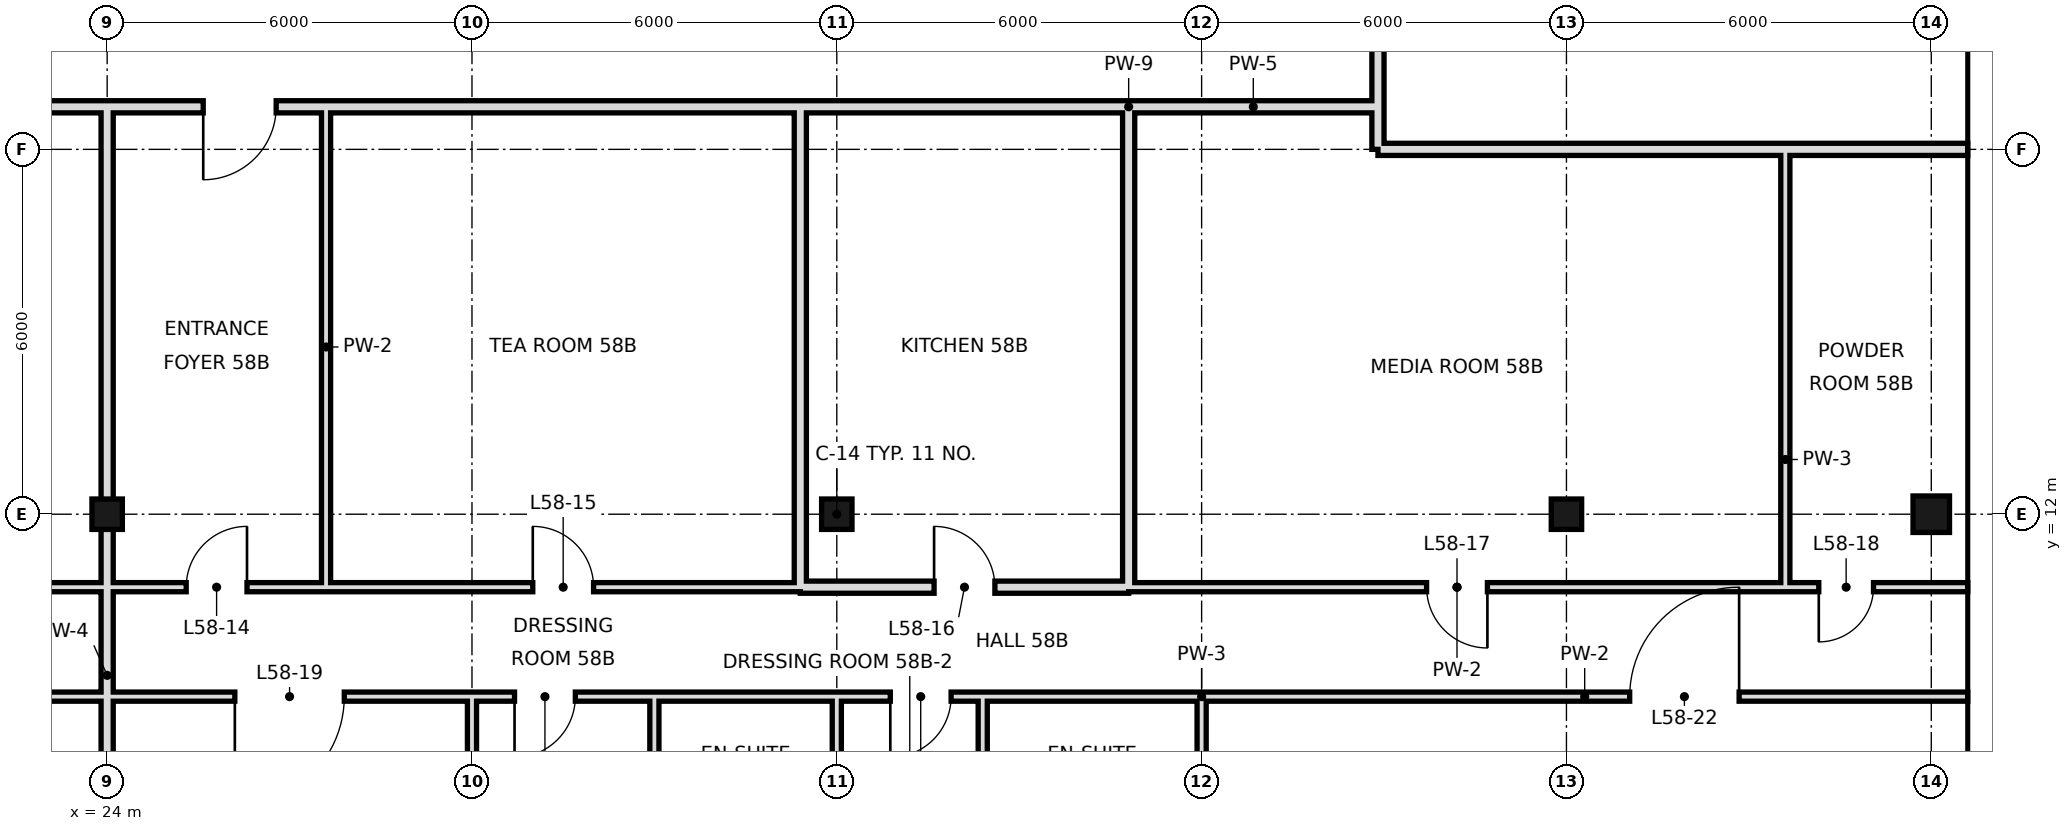
"""IFC4 building model, lengths in metres.
Left out: names, types, materials, properties, quantities, classifications, styles, units other than length and angle.
Written with IfcOpenShell. Run it as: python <this file> out.ifc"""

import sys

from ifc_helpers import new_model, si_unit, direction, frame, frame_2d, origin, origin_2d, place, context, subcontext, project, spatial, rectangle, hollow_rectangle, extrude, element, fill, save


model = new_model("IFC4")
c1 = context("Model", 3, precision=1e-05, world=origin(), true_north=direction((0.0, 1.0)))
c2 = subcontext(c1, "Body", "Model", "MODEL_VIEW")
j1 = project(units=[si_unit("LENGTHUNIT", "METRE"), si_unit("PLANEANGLEUNIT", "RADIAN")], contexts=[c1])
p1 = place(None, origin())
s1 = spatial("IfcSite", under=j1, at=p1, CompositionType="ELEMENT")
p2 = place(p1, origin())
s2 = spatial("IfcBuilding", under=s1, at=p2, CompositionType="ELEMENT")
p3 = place(p2, frame((0.0, 0.0, 246.8)))
s3 = spatial("IfcBuildingStorey", under=s2, at=p3, CompositionType="ELEMENT", Elevation=246.8)
for number, where, z_axis, x_axis in (
    (1, (24.0, 12.0, 0.0), (0.0, 0.0, 1.0), (1.0, 0.0, 0.0)),
    (2, (36.0, 12.0, 0.0), (0.0, 0.0, 1.0), (1.0, 0.0, 0.0)),
    (3, (48.0, 12.0, 0.0), (0.0, 0.0, 1.0), (1.0, 0.0, 0.0)),
):
    element("IfcColumn", number, at=place(p3, frame(where, z_axis=z_axis, x_axis=x_axis)), inside=s3, PredefinedType="COLUMN", context=c2, shape_type="SweptSolid", body=[
        extrude(hollow_rectangle(XDim=0.5, YDim=0.5, WallThickness=0.025, at=origin_2d()), origin(), (0.0, 0.0, 1.0), 3.6),
    ])
p4 = place(p3, frame((54.0, 12.0, 0.0), z_axis=(0.0, 0.0, 1.0), x_axis=(1.0, 0.0, 0.0)))
e4 = element("IfcColumn", 4, at=p4, inside=s3, PredefinedType="COLUMN", context=c2, shape_type="SweptSolid", body=[
    extrude(hollow_rectangle(XDim=0.6, YDim=0.6, WallThickness=0.028, at=origin_2d()), origin(), (0.0, 0.0, 1.0), 3.6),
])
p5 = place(p3, frame((24.0, 0.0, 0.0), z_axis=(0.0, 0.0, 1.0), x_axis=(0.0, 1.0, 0.0)))
e5 = element("IfcWall", 5, at=p5, inside=s3, PredefinedType="SOLIDWALL", context=c2, shape_type="SweptSolid", body=[
    extrude(rectangle(XDim=18.7, YDim=0.2, at=frame_2d((9.35, 0.0))), origin(), (0.0, 0.0, 1.0), 2.72),
])
p6 = place(p3, frame((27.6, 10.8, 0.0), z_axis=(0.0, 0.0, 1.0), x_axis=(0.0, 1.0, 0.0)))
e6 = element("IfcWall", 6, at=p6, inside=s3, PredefinedType="PARTITIONING", context=c2, shape_type="SweptSolid", body=[
    extrude(rectangle(XDim=7.9, YDim=0.15, at=frame_2d((3.95, 0.0))), origin(), (0.0, 0.0, 1.0), 3.42),
])
p7 = place(p3, frame((30.0, -0.6, 0.0), z_axis=(0.0, 0.0, 1.0), x_axis=(0.0, 1.0, 0.0)))
e7 = element("IfcWall", 7, at=p7, inside=s3, PredefinedType="PARTITIONING", context=c2, shape_type="SweptSolid", body=[
    extrude(rectangle(XDim=9.6, YDim=0.15, at=frame_2d((4.8, 0.0))), origin(), (0.0, 0.0, 1.0), 2.72),
])
p8 = place(p3, frame((33.0, 6.0, 0.0), z_axis=(0.0, 0.0, 1.0), x_axis=(0.0, 1.0, 0.0)))
e8 = element("IfcWall", 8, at=p8, inside=s3, PredefinedType="PARTITIONING", context=c2, shape_type="SweptSolid", body=[
    extrude(rectangle(XDim=3.0, YDim=0.15, at=frame_2d((1.5, 0.0))), origin(), (0.0, 0.0, 1.0), 3.42),
])
p9 = place(p3, frame((35.4, 10.8, 0.0), z_axis=(0.0, 0.0, 1.0), x_axis=(0.0, 1.0, 0.0)))
e9 = element("IfcWall", 9, at=p9, inside=s3, PredefinedType="SOLIDWALL", context=c2, shape_type="SweptSolid", body=[
    extrude(rectangle(XDim=7.9, YDim=0.2, at=frame_2d((3.95, 0.0))), origin(), (0.0, 0.0, 1.0), 2.72),
])
p10 = place(p3, frame((36.0, 6.0, 0.0), z_axis=(0.0, 0.0, 1.0), x_axis=(0.0, 1.0, 0.0)))
e10 = element("IfcWall", 10, at=p10, inside=s3, PredefinedType="PARTITIONING", context=c2, shape_type="SweptSolid", body=[
    extrude(rectangle(XDim=3.0, YDim=0.15, at=frame_2d((1.5, 0.0))), origin(), (0.0, 0.0, 1.0), 2.72),
])
p11 = place(p3, frame((38.4, 6.0, 0.0), z_axis=(0.0, 0.0, 1.0), x_axis=(0.0, 1.0, 0.0)))
e11 = element("IfcWall", 11, at=p11, inside=s3, PredefinedType="PARTITIONING", context=c2, shape_type="SweptSolid", body=[
    extrude(rectangle(XDim=3.0, YDim=0.15, at=frame_2d((1.5, 0.0))), origin(), (0.0, 0.0, 1.0), 3.42),
])
p12 = place(p3, frame((40.8, 10.8, 0.0), z_axis=(0.0, 0.0, 1.0), x_axis=(0.0, 1.0, 0.0)))
e12 = element("IfcWall", 12, at=p12, inside=s3, PredefinedType="SOLIDWALL", context=c2, shape_type="SweptSolid", body=[
    extrude(rectangle(XDim=7.9, YDim=0.2, at=frame_2d((3.95, 0.0))), origin(), (0.0, 0.0, 1.0), 2.72),
])
p13 = place(p3, frame((42.0, 6.0, 0.0), z_axis=(0.0, 0.0, 1.0), x_axis=(0.0, 1.0, 0.0)))
e13 = element("IfcWall", 13, at=p13, inside=s3, PredefinedType="PARTITIONING", context=c2, shape_type="SweptSolid", body=[
    extrude(rectangle(XDim=3.0, YDim=0.15, at=frame_2d((1.5, 0.0))), origin(), (0.0, 0.0, 1.0), 2.72),
])
p14 = place(p3, frame((44.9, 18.0, 0.0), z_axis=(0.0, 0.0, 1.0), x_axis=(0.0, 1.0, 0.0)))
e14 = element("IfcWall", 14, at=p14, inside=s3, PredefinedType="SOLIDWALL", context=c2, shape_type="SweptSolid", body=[
    extrude(rectangle(XDim=30.6, YDim=0.2, at=frame_2d((15.3, 0.0))), origin(), (0.0, 0.0, 1.0), 2.72),
])
p15 = place(p14, frame((20.27, 0.0, 0.0)))
e15 = element("IfcOpeningElement", 15, at=p15, cuts=e14, PredefinedType="OPENING", context=c2, shape_type="SweptSolid", body=[
    extrude(rectangle(XDim=1.2, YDim=2.4, at=frame_2d((0.6, 1.2))), frame((0.0, 0.11, 0.0), z_axis=(0.0, -1.0, 0.0), x_axis=(1.0, 0.0, 0.0)), (0.0, 0.0, 1.0), 0.22),
])
p16 = place(p3, frame((51.6, 10.8, 0.0), z_axis=(0.0, 0.0, 1.0), x_axis=(0.0, 1.0, 0.0)))
e16 = element("IfcWall", 16, at=p16, inside=s3, PredefinedType="PARTITIONING", context=c2, shape_type="SweptSolid", body=[
    extrude(rectangle(XDim=7.2, YDim=0.15, at=frame_2d((3.6, 0.0))), origin(), (0.0, 0.0, 1.0), 3.42),
])
p17 = place(p3, frame((35.4, 10.8, 0.0), z_axis=(0.0, 0.0, 1.0), x_axis=(1.0, 0.0, 0.0)))
e17 = element("IfcWall", 17, at=p17, inside=s3, PredefinedType="SOLIDWALL", context=c2, shape_type="SweptSolid", body=[
    extrude(rectangle(XDim=5.4, YDim=0.2, at=frame_2d((2.7, 0.0))), origin(), (0.0, 0.0, 1.0), 2.72),
])
p18 = place(p17, frame((2.2, 0.0, 0.0)))
e18 = element("IfcOpeningElement", 18, at=p18, cuts=e17, PredefinedType="OPENING", context=c2, shape_type="SweptSolid", body=[
    extrude(rectangle(XDim=1.0, YDim=2.4, at=frame_2d((0.5, 1.2))), frame((0.0, 0.11, 0.0), z_axis=(0.0, -1.0, 0.0), x_axis=(1.0, 0.0, 0.0)), (0.0, 0.0, 1.0), 0.22),
])
p19 = place(p3, frame((6.0, 10.8, 0.0), z_axis=(0.0, 0.0, 1.0), x_axis=(1.0, 0.0, 0.0)))
e19 = element("IfcWall", 19, at=p19, inside=s3, PredefinedType="PARTITIONING", context=c2, shape_type="SweptSolid", body=[
    extrude(rectangle(XDim=29.4, YDim=0.15, at=frame_2d((14.7, 0.0))), origin(), (0.0, 0.0, 1.0), 3.42),
])
p20 = place(p19, frame((3.4, 0.0, 0.0)))
e20 = element("IfcOpeningElement", 20, at=p20, cuts=e19, PredefinedType="OPENING", context=c2, shape_type="SweptSolid", body=[
    extrude(rectangle(XDim=1.0, YDim=2.4, at=frame_2d((0.5, 1.2))), frame((0.0, 0.085, 0.0), z_axis=(0.0, -1.0, 0.0), x_axis=(1.0, 0.0, 0.0)), (0.0, 0.0, 1.0), 0.17),
])
p21 = place(p19, frame((9.4, 0.0, 0.0)))
e21 = element("IfcOpeningElement", 21, at=p21, cuts=e19, PredefinedType="OPENING", context=c2, shape_type="SweptSolid", body=[
    extrude(rectangle(XDim=1.0, YDim=2.4, at=frame_2d((0.5, 1.2))), frame((0.0, 0.085, 0.0), z_axis=(0.0, -1.0, 0.0), x_axis=(1.0, 0.0, 0.0)), (0.0, 0.0, 1.0), 0.17),
])
p22 = place(p19, frame((19.3, 0.0, 0.0)))
e22 = element("IfcOpeningElement", 22, at=p22, cuts=e19, PredefinedType="OPENING", context=c2, shape_type="SweptSolid", body=[
    extrude(rectangle(XDim=1.0, YDim=2.4, at=frame_2d((0.5, 1.2))), frame((0.0, 0.085, 0.0), z_axis=(0.0, -1.0, 0.0), x_axis=(1.0, 0.0, 0.0)), (0.0, 0.0, 1.0), 0.17),
])
p23 = place(p19, frame((25.0, 0.0, 0.0)))
e23 = element("IfcOpeningElement", 23, at=p23, cuts=e19, PredefinedType="OPENING", context=c2, shape_type="SweptSolid", body=[
    extrude(rectangle(XDim=1.0, YDim=2.4, at=frame_2d((0.5, 1.2))), frame((0.0, 0.085, 0.0), z_axis=(0.0, -1.0, 0.0), x_axis=(1.0, 0.0, 0.0)), (0.0, 0.0, 1.0), 0.17),
])
p24 = place(p3, frame((40.8, 10.8, 0.0), z_axis=(0.0, 0.0, 1.0), x_axis=(1.0, 0.0, 0.0)))
e24 = element("IfcWall", 24, at=p24, inside=s3, PredefinedType="PARTITIONING", context=c2, shape_type="SweptSolid", body=[
    extrude(rectangle(XDim=10.8, YDim=0.15, at=frame_2d((5.4, 0.0))), origin(), (0.0, 0.0, 1.0), 3.42),
])
p25 = place(p24, frame((4.9, 0.0, 0.0)))
e25 = element("IfcOpeningElement", 25, at=p25, cuts=e24, PredefinedType="OPENING", context=c2, shape_type="SweptSolid", body=[
    extrude(rectangle(XDim=1.0, YDim=2.4, at=frame_2d((0.5, 1.2))), frame((0.0, 0.085, 0.0), z_axis=(0.0, -1.0, 0.0), x_axis=(1.0, 0.0, 0.0)), (0.0, 0.0, 1.0), 0.17),
])
p26 = place(p3, frame((51.6, 10.8, 0.0), z_axis=(0.0, 0.0, 1.0), x_axis=(1.0, 0.0, 0.0)))
e26 = element("IfcWall", 26, at=p26, inside=s3, PredefinedType="PARTITIONING", context=c2, shape_type="SweptSolid", body=[
    extrude(rectangle(XDim=3.0, YDim=0.15, at=frame_2d((1.5, 0.0))), origin(), (0.0, 0.0, 1.0), 3.42),
])
p27 = place(p26, frame((0.55, 0.0, 0.0)))
e27 = element("IfcOpeningElement", 27, at=p27, cuts=e26, PredefinedType="OPENING", context=c2, shape_type="SweptSolid", body=[
    extrude(rectangle(XDim=0.9, YDim=2.4, at=frame_2d((0.45, 1.2))), frame((0.0, 0.085, 0.0), z_axis=(0.0, -1.0, 0.0), x_axis=(1.0, 0.0, 0.0)), (0.0, 0.0, 1.0), 0.17),
])
p28 = place(p3, frame((44.9, 18.0, 0.0), z_axis=(0.0, 0.0, 1.0), x_axis=(1.0, 0.0, 0.0)))
e28 = element("IfcWall", 28, at=p28, inside=s3, PredefinedType="SOLIDWALL", context=c2, shape_type="SweptSolid", body=[
    extrude(rectangle(XDim=9.7, YDim=0.2, at=frame_2d((4.85, 0.0))), origin(), (0.0, 0.0, 1.0), 2.72),
])
p29 = place(p3, frame((6.0, 18.7, 0.0), z_axis=(0.0, 0.0, 1.0), x_axis=(1.0, 0.0, 0.0)))
e29 = element("IfcWall", 29, at=p29, inside=s3, PredefinedType="SOLIDWALL", context=c2, shape_type="SweptSolid", body=[
    extrude(rectangle(XDim=29.4, YDim=0.2, at=frame_2d((14.7, 0.0))), origin(), (0.0, 0.0, 1.0), 2.72),
])
p30 = place(p29, frame((1.54, 0.0, 0.0)))
e30 = element("IfcOpeningElement", 30, at=p30, cuts=e29, PredefinedType="OPENING", context=c2, shape_type="SweptSolid", body=[
    extrude(rectangle(XDim=1.2, YDim=2.4, at=frame_2d((0.6, 1.2))), frame((0.0, 0.11, 0.0), z_axis=(0.0, -1.0, 0.0), x_axis=(1.0, 0.0, 0.0)), (0.0, 0.0, 1.0), 0.22),
])
p31 = place(p29, frame((19.58, 0.0, 0.0)))
e31 = element("IfcOpeningElement", 31, at=p31, cuts=e29, PredefinedType="OPENING", context=c2, shape_type="SweptSolid", body=[
    extrude(rectangle(XDim=1.2, YDim=2.4, at=frame_2d((0.6, 1.2))), frame((0.0, 0.11, 0.0), z_axis=(0.0, -1.0, 0.0), x_axis=(1.0, 0.0, 0.0)), (0.0, 0.0, 1.0), 0.22),
])
p32 = place(p3, frame((40.8, 18.7, 0.0), z_axis=(0.0, 0.0, 1.0), x_axis=(1.0, 0.0, 0.0)))
e32 = element("IfcWall", 32, at=p32, inside=s3, PredefinedType="SOLIDWALL", context=c2, shape_type="SweptSolid", body=[
    extrude(rectangle(XDim=4.1, YDim=0.2, at=frame_2d((2.05, 0.0))), origin(), (0.0, 0.0, 1.0), 2.72),
])
p33 = place(p3, frame((35.4, 18.7, 0.0), z_axis=(0.0, 0.0, 1.0), x_axis=(1.0, 0.0, 0.0)))
e33 = element("IfcWall", 33, at=p33, inside=s3, PredefinedType="SOLIDWALL", context=c2, shape_type="SweptSolid", body=[
    extrude(rectangle(XDim=5.4, YDim=0.2, at=frame_2d((2.7, 0.0))), origin(), (0.0, 0.0, 1.0), 3.42),
])
p34 = place(p3, frame((0.0, 9.0, 0.0), z_axis=(0.0, 0.0, 1.0), x_axis=(1.0, 0.0, 0.0)))
e34 = element("IfcWall", 34, at=p34, inside=s3, PredefinedType="PARTITIONING", context=c2, shape_type="SweptSolid", body=[
    extrude(rectangle(XDim=33.0, YDim=0.15, at=frame_2d((16.5, 0.0))), origin(), (0.0, 0.0, 1.0), 3.42),
])
p35 = place(p34, frame((1.6, 0.0, 0.0)))
e35 = element("IfcOpeningElement", 35, at=p35, cuts=e34, PredefinedType="OPENING", context=c2, shape_type="SweptSolid", body=[
    extrude(rectangle(XDim=1.0, YDim=2.4, at=frame_2d((0.5, 1.2))), frame((0.0, 0.085, 0.0), z_axis=(0.0, -1.0, 0.0), x_axis=(1.0, 0.0, 0.0)), (0.0, 0.0, 1.0), 0.17),
])
p36 = place(p34, frame((9.4, 0.0, 0.0)))
e36 = element("IfcOpeningElement", 36, at=p36, cuts=e34, PredefinedType="OPENING", context=c2, shape_type="SweptSolid", body=[
    extrude(rectangle(XDim=1.0, YDim=2.4, at=frame_2d((0.5, 1.2))), frame((0.0, 0.085, 0.0), z_axis=(0.0, -1.0, 0.0), x_axis=(1.0, 0.0, 0.0)), (0.0, 0.0, 1.0), 0.17),
])
p37 = place(p34, frame((15.16, 0.0, 0.0)))
e37 = element("IfcOpeningElement", 37, at=p37, cuts=e34, PredefinedType="OPENING", context=c2, shape_type="SweptSolid", body=[
    extrude(rectangle(XDim=1.8, YDim=2.4, at=frame_2d((0.9, 1.2))), frame((0.0, 0.085, 0.0), z_axis=(0.0, -1.0, 0.0), x_axis=(1.0, 0.0, 0.0)), (0.0, 0.0, 1.0), 0.17),
])
p38 = place(p34, frame((26.1, 0.0, 0.0)))
e38 = element("IfcOpeningElement", 38, at=p38, cuts=e34, PredefinedType="OPENING", context=c2, shape_type="SweptSolid", body=[
    extrude(rectangle(XDim=1.8, YDim=2.4, at=frame_2d((0.9, 1.2))), frame((0.0, 0.085, 0.0), z_axis=(0.0, -1.0, 0.0), x_axis=(1.0, 0.0, 0.0)), (0.0, 0.0, 1.0), 0.17),
])
p39 = place(p34, frame((30.7, 0.0, 0.0)))
e39 = element("IfcOpeningElement", 39, at=p39, cuts=e34, PredefinedType="OPENING", context=c2, shape_type="SweptSolid", body=[
    extrude(rectangle(XDim=1.0, YDim=2.4, at=frame_2d((0.5, 1.2))), frame((0.0, 0.085, 0.0), z_axis=(0.0, -1.0, 0.0), x_axis=(1.0, 0.0, 0.0)), (0.0, 0.0, 1.0), 0.17),
])
p40 = place(p3, frame((36.0, 9.0, 0.0), z_axis=(0.0, 0.0, 1.0), x_axis=(1.0, 0.0, 0.0)))
e40 = element("IfcWall", 40, at=p40, inside=s3, PredefinedType="PARTITIONING", context=c2, shape_type="SweptSolid", body=[
    extrude(rectangle(XDim=2.4, YDim=0.15, at=frame_2d((1.2, 0.0))), origin(), (0.0, 0.0, 1.0), 3.42),
])
p41 = place(p40, frame((0.88, 0.0, 0.0)))
e41 = element("IfcOpeningElement", 41, at=p41, cuts=e40, PredefinedType="OPENING", context=c2, shape_type="SweptSolid", body=[
    extrude(rectangle(XDim=1.0, YDim=2.4, at=frame_2d((0.5, 1.2))), frame((0.0, 0.085, 0.0), z_axis=(0.0, -1.0, 0.0), x_axis=(1.0, 0.0, 0.0)), (0.0, 0.0, 1.0), 0.17),
])
p42 = place(p3, frame((42.0, 9.0, 0.0), z_axis=(0.0, 0.0, 1.0), x_axis=(1.0, 0.0, 0.0)))
e42 = element("IfcWall", 42, at=p42, inside=s3, PredefinedType="PARTITIONING", context=c2, shape_type="SweptSolid", body=[
    extrude(rectangle(XDim=12.6, YDim=0.15, at=frame_2d((6.3, 0.0))), origin(), (0.0, 0.0, 1.0), 3.42),
])
p43 = place(p42, frame((7.04, 0.0, 0.0)))
e43 = element("IfcOpeningElement", 43, at=p43, cuts=e42, PredefinedType="OPENING", context=c2, shape_type="SweptSolid", body=[
    extrude(rectangle(XDim=1.8, YDim=2.4, at=frame_2d((0.9, 1.2))), frame((0.0, 0.085, 0.0), z_axis=(0.0, -1.0, 0.0), x_axis=(1.0, 0.0, 0.0)), (0.0, 0.0, 1.0), 0.17),
])
p44 = place(p3, frame((33.0, 9.0, 0.0), z_axis=(0.0, 0.0, 1.0), x_axis=(1.0, 0.0, 0.0)))
e44 = element("IfcWall", 44, at=p44, inside=s3, PredefinedType="PARTITIONING", context=c2, shape_type="SweptSolid", body=[
    extrude(rectangle(XDim=3.0, YDim=0.15, at=frame_2d((1.5, 0.0))), origin(), (0.0, 0.0, 1.0), 3.42),
])
p45 = place(p3, frame((38.4, 9.0, 0.0), z_axis=(0.0, 0.0, 1.0), x_axis=(1.0, 0.0, 0.0)))
e45 = element("IfcWall", 45, at=p45, inside=s3, PredefinedType="PARTITIONING", context=c2, shape_type="SweptSolid", body=[
    extrude(rectangle(XDim=3.6, YDim=0.15, at=frame_2d((1.8, 0.0))), origin(), (0.0, 0.0, 1.0), 3.42),
])
p46 = place(p22, frame((1.0, 0.0, 0.0), z_axis=(0.0, 0.0, 1.0), x_axis=(-1.0, 0.0, 0.0)))
e46 = element("IfcDoor", 46, at=p46, inside=s3, OperationType="SINGLE_SWING_LEFT", PredefinedType="DOOR", context=c2, shape_type="SweptSolid", body=[
    extrude(rectangle(XDim=1.0, YDim=2.4, at=frame_2d((0.5, 1.2))), frame((0.0, 0.025, 0.0), z_axis=(0.0, -1.0, 0.0), x_axis=(1.0, 0.0, 0.0)), (0.0, 0.0, 1.0), 0.05),
])
fill(e22, e46)
p47 = place(p23, origin())
e47 = element("IfcDoor", 47, at=p47, inside=s3, OperationType="SINGLE_SWING_LEFT", PredefinedType="DOOR", context=c2, shape_type="SweptSolid", body=[
    extrude(rectangle(XDim=1.0, YDim=2.4, at=frame_2d((0.5, 1.2))), frame((0.0, 0.025, 0.0), z_axis=(0.0, -1.0, 0.0), x_axis=(1.0, 0.0, 0.0)), (0.0, 0.0, 1.0), 0.05),
])
fill(e23, e47)
p48 = place(p18, origin())
e48 = element("IfcDoor", 48, at=p48, inside=s3, OperationType="SINGLE_SWING_LEFT", PredefinedType="DOOR", context=c2, shape_type="SweptSolid", body=[
    extrude(rectangle(XDim=1.0, YDim=2.4, at=frame_2d((0.5, 1.2))), frame((0.0, 0.025, 0.0), z_axis=(0.0, -1.0, 0.0), x_axis=(1.0, 0.0, 0.0)), (0.0, 0.0, 1.0), 0.05),
])
fill(e18, e48)
p49 = place(p25, origin())
e49 = element("IfcDoor", 49, at=p49, inside=s3, OperationType="SINGLE_SWING_RIGHT", PredefinedType="DOOR", context=c2, shape_type="SweptSolid", body=[
    extrude(rectangle(XDim=1.0, YDim=2.4, at=frame_2d((0.5, 1.2))), frame((0.0, 0.025, 0.0), z_axis=(0.0, -1.0, 0.0), x_axis=(1.0, 0.0, 0.0)), (0.0, 0.0, 1.0), 0.05),
])
fill(e25, e49)
p50 = place(p27, frame((0.9, 0.0, 0.0), z_axis=(0.0, 0.0, 1.0), x_axis=(-1.0, 0.0, 0.0)))
e50 = element("IfcDoor", 50, at=p50, inside=s3, OperationType="SINGLE_SWING_RIGHT", PredefinedType="DOOR", context=c2, shape_type="SweptSolid", body=[
    extrude(rectangle(XDim=0.9, YDim=2.4, at=frame_2d((0.45, 1.2))), frame((0.0, 0.025, 0.0), z_axis=(0.0, -1.0, 0.0), x_axis=(1.0, 0.0, 0.0)), (0.0, 0.0, 1.0), 0.05),
])
fill(e27, e50)
p51 = place(p38, frame((1.8, 0.0, 0.0), z_axis=(0.0, 0.0, 1.0), x_axis=(-1.0, 0.0, 0.0)))
e51 = element("IfcDoor", 51, at=p51, inside=s3, OperationType="SINGLE_SWING_RIGHT", PredefinedType="DOOR", context=c2, shape_type="SweptSolid", body=[
    extrude(rectangle(XDim=1.8, YDim=2.4, at=frame_2d((0.9, 1.2))), frame((0.0, 0.025, 0.0), z_axis=(0.0, -1.0, 0.0), x_axis=(1.0, 0.0, 0.0)), (0.0, 0.0, 1.0), 0.05),
])
fill(e38, e51)
p52 = place(p39, frame((1.0, 0.0, 0.0), z_axis=(0.0, 0.0, 1.0), x_axis=(-1.0, 0.0, 0.0)))
e52 = element("IfcDoor", 52, at=p52, inside=s3, OperationType="SINGLE_SWING_RIGHT", PredefinedType="DOOR", context=c2, shape_type="SweptSolid", body=[
    extrude(rectangle(XDim=1.0, YDim=2.4, at=frame_2d((0.5, 1.2))), frame((0.0, 0.025, 0.0), z_axis=(0.0, -1.0, 0.0), x_axis=(1.0, 0.0, 0.0)), (0.0, 0.0, 1.0), 0.05),
])
fill(e39, e52)
p53 = place(p41, frame((1.0, 0.0, 0.0), z_axis=(0.0, 0.0, 1.0), x_axis=(-1.0, 0.0, 0.0)))
e53 = element("IfcDoor", 53, at=p53, inside=s3, OperationType="SINGLE_SWING_RIGHT", PredefinedType="DOOR", context=c2, shape_type="SweptSolid", body=[
    extrude(rectangle(XDim=1.0, YDim=2.4, at=frame_2d((0.5, 1.2))), frame((0.0, 0.025, 0.0), z_axis=(0.0, -1.0, 0.0), x_axis=(1.0, 0.0, 0.0)), (0.0, 0.0, 1.0), 0.05),
])
fill(e41, e53)
p54 = place(p43, frame((1.8, 0.0, 0.0), z_axis=(0.0, 0.0, 1.0), x_axis=(-1.0, 0.0, 0.0)))
e54 = element("IfcDoor", 54, at=p54, inside=s3, OperationType="SINGLE_SWING_LEFT", PredefinedType="DOOR", context=c2, shape_type="SweptSolid", body=[
    extrude(rectangle(XDim=1.8, YDim=2.4, at=frame_2d((0.9, 1.2))), frame((0.0, 0.025, 0.0), z_axis=(0.0, -1.0, 0.0), x_axis=(1.0, 0.0, 0.0)), (0.0, 0.0, 1.0), 0.05),
])
fill(e43, e54)
p55 = place(p31, frame((1.2, 0.0, 0.0), z_axis=(0.0, 0.0, 1.0), x_axis=(-1.0, 0.0, 0.0)))
e55 = element("IfcDoor", 55, at=p55, inside=s3, OperationType="SINGLE_SWING_RIGHT", PredefinedType="DOOR", context=c2, shape_type="SweptSolid", body=[
    extrude(rectangle(XDim=1.2, YDim=2.4, at=frame_2d((0.6, 1.2))), frame((0.0, 0.025, 0.0), z_axis=(0.0, -1.0, 0.0), x_axis=(1.0, 0.0, 0.0)), (0.0, 0.0, 1.0), 0.05),
])
fill(e31, e55)
save(model, sys.argv[1])
